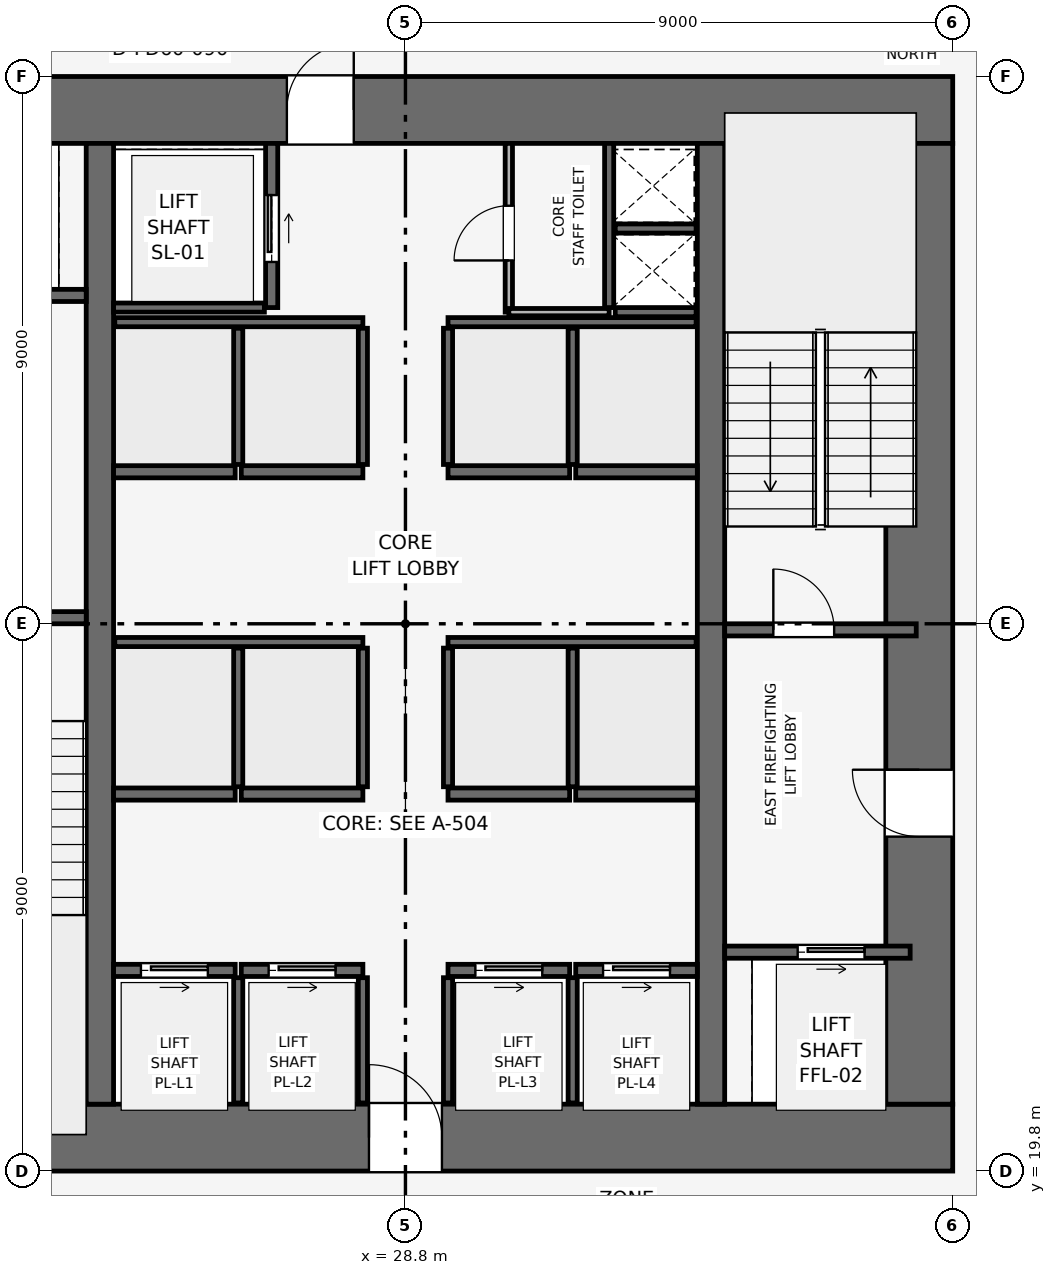
"""IFC4 building model, lengths in metres.
Left out: names, types, materials, properties, quantities, classifications, styles, units other than length and angle.
Written with IfcOpenShell. Run it as: python <this file> out.ifc"""

import sys

from ifc_helpers import new_model, si_unit, direction, frame, frame_2d, origin, place, context, subcontext, project, spatial, rectangle, extrude, element, fill, save


model = new_model("IFC4")
c1 = context("Model", 3, precision=1e-05, world=origin(), true_north=direction((0.0, 1.0)))
c2 = subcontext(c1, "Body", "Model", "MODEL_VIEW")
j1 = project(units=[si_unit("LENGTHUNIT", "METRE"), si_unit("PLANEANGLEUNIT", "RADIAN")], contexts=[c1])
p1 = place(None, origin())
s1 = spatial("IfcSite", under=j1, at=p1, CompositionType="ELEMENT")
p2 = place(p1, origin())
s2 = spatial("IfcBuilding", under=s1, at=p2, CompositionType="ELEMENT")
p3 = place(p2, frame((0.0, 0.0, 41.7)))
s3 = spatial("IfcBuildingStorey", under=s2, at=p3, CompositionType="ELEMENT", Elevation=41.7)
p4 = place(p3, frame((19.8, 20.35, 0.0), z_axis=(0.0, 0.0, 1.0), x_axis=(1.0, 0.0, 0.0)))
e1 = element("IfcWall", 1, at=p4, inside=s3, PredefinedType="SHEAR", context=c2, shape_type="SweptSolid", body=[
    extrude(rectangle(XDim=18.0, YDim=1.1, at=frame_2d((9.0, 0.0))), origin(), (0.0, 0.0, 1.0), 3.9),
])
p5 = place(p4, frame((8.4, 0.0, 0.0)))
e2 = element("IfcOpeningElement", 2, at=p5, cuts=e1, PredefinedType="OPENING", context=c2, shape_type="SweptSolid", body=[
    extrude(rectangle(XDim=1.2, YDim=2.2, at=frame_2d((0.6, 1.1))), frame((0.0, 0.56, 0.0), z_axis=(0.0, -1.0, 0.0), x_axis=(1.0, 0.0, 0.0)), (0.0, 0.0, 1.0), 1.12),
])
p6 = place(p3, frame((19.8, 37.25, 0.0), z_axis=(0.0, 0.0, 1.0), x_axis=(1.0, 0.0, 0.0)))
e3 = element("IfcWall", 3, at=p6, inside=s3, PredefinedType="SHEAR", context=c2, shape_type="SweptSolid", body=[
    extrude(rectangle(XDim=18.0, YDim=1.1, at=frame_2d((9.0, 0.0))), origin(), (0.0, 0.0, 1.0), 3.9),
])
p7 = place(p6, frame((7.05, 0.0, 0.0)))
e4 = element("IfcOpeningElement", 4, at=p7, cuts=e3, PredefinedType="OPENING", context=c2, shape_type="SweptSolid", body=[
    extrude(rectangle(XDim=1.1, YDim=2.15, at=frame_2d((0.55, 1.075))), frame((0.0, 0.56, 0.0), z_axis=(0.0, -1.0, 0.0), x_axis=(1.0, 0.0, 0.0)), (0.0, 0.0, 1.0), 1.12),
])
p8 = place(p3, frame((37.25, 20.9, 0.0), z_axis=(0.0, 0.0, 1.0), x_axis=(0.0, 1.0, 0.0)))
e5 = element("IfcWall", 5, at=p8, inside=s3, PredefinedType="SHEAR", context=c2, shape_type="SweptSolid", body=[
    extrude(rectangle(XDim=15.8, YDim=1.1, at=frame_2d((7.9, 0.0))), origin(), (0.0, 0.0, 1.0), 3.9),
])
p9 = place(p8, frame((4.4, 0.0, 0.0)))
e6 = element("IfcOpeningElement", 6, at=p9, cuts=e5, PredefinedType="OPENING", context=c2, shape_type="SweptSolid", body=[
    extrude(rectangle(XDim=1.1, YDim=2.15, at=frame_2d((0.55, 1.075))), frame((0.0, 0.56, 0.0), z_axis=(0.0, -1.0, 0.0), x_axis=(1.0, 0.0, 0.0)), (0.0, 0.0, 1.0), 1.12),
])
for number, where, z_axis, x_axis in (
    (7, (23.775, 20.9, 0.0), (0.0, 0.0, 1.0), (0.0, 1.0, 0.0)),
    (8, (33.825, 20.9, 0.0), (0.0, 0.0, 1.0), (0.0, 1.0, 0.0)),
):
    element("IfcWall", number, at=place(p3, frame(where, z_axis=z_axis, x_axis=x_axis)), inside=s3, PredefinedType="SHEAR", context=c2, shape_type="SweptSolid", body=[
        extrude(rectangle(XDim=15.8, YDim=0.45, at=frame_2d((7.9, 0.0))), origin(), (0.0, 0.0, 1.0), 3.9),
    ])
p10 = place(p3, frame((20.4, 28.9, 0.0), z_axis=(0.0, 0.0, 1.0), x_axis=(1.0, 0.0, 0.0)))
e9 = element("IfcWall", 9, at=p10, inside=s3, PredefinedType="SHEAR", context=c2, shape_type="SweptSolid", body=[
    extrude(rectangle(XDim=3.15, YDim=0.2, at=frame_2d((1.575, 0.0))), origin(), (0.0, 0.0, 1.0), 3.65),
])
p11 = place(p10, frame((0.8, 0.0, 0.0)))
e10 = element("IfcOpeningElement", 10, at=p11, cuts=e9, PredefinedType="OPENING", context=c2, shape_type="SweptSolid", body=[
    extrude(rectangle(XDim=1.0, YDim=2.1, at=frame_2d((0.5, 1.05))), frame((0.0, 0.11, 0.0), z_axis=(0.0, -1.0, 0.0), x_axis=(1.0, 0.0, 0.0)), (0.0, 0.0, 1.0), 0.22),
])
p12 = place(p3, frame((34.05, 28.7, 0.0), z_axis=(0.0, 0.0, 1.0), x_axis=(1.0, 0.0, 0.0)))
e11 = element("IfcWall", 11, at=p12, inside=s3, PredefinedType="SHEAR", context=c2, shape_type="SweptSolid", body=[
    extrude(rectangle(XDim=3.15, YDim=0.2, at=frame_2d((1.575, 0.0))), origin(), (0.0, 0.0, 1.0), 3.65),
])
p13 = place(p12, frame((0.8, 0.0, 0.0)))
e12 = element("IfcOpeningElement", 12, at=p13, cuts=e11, PredefinedType="OPENING", context=c2, shape_type="SweptSolid", body=[
    extrude(rectangle(XDim=1.0, YDim=2.1, at=frame_2d((0.5, 1.05))), frame((0.0, 0.11, 0.0), z_axis=(0.0, -1.0, 0.0), x_axis=(1.0, 0.0, 0.0)), (0.0, 0.0, 1.0), 0.22),
])
p14 = place(p3, frame((32.15, 34.0, 0.0), z_axis=(0.0, 0.0, 1.0), x_axis=(0.0, 1.0, 0.0)))
e13 = element("IfcWall", 13, at=p14, inside=s3, PredefinedType="SHEAR", context=c2, shape_type="SweptSolid", body=[
    extrude(rectangle(XDim=2.7, YDim=0.15, at=frame_2d((1.35, 0.0))), origin(), (0.0, 0.0, 1.0), 3.65),
])
for number, where, z_axis, x_axis in (
    (14, (32.25, 33.925, 0.0), (0.0, 0.0, 1.0), (1.0, 0.0, 0.0)),
    (15, (32.25, 35.3, 0.0), (0.0, 0.0, 1.0), (1.0, 0.0, 0.0)),
):
    element("IfcWall", number, at=place(p3, frame(where, z_axis=z_axis, x_axis=x_axis)), inside=s3, PredefinedType="SHEAR", context=c2, shape_type="SweptSolid", body=[
        extrude(rectangle(XDim=1.33, YDim=0.15, at=frame_2d((0.665, 0.0))), origin(), (0.0, 0.0, 1.0), 3.65),
    ])
p15 = place(p3, frame((20.5, 34.2, 0.0), z_axis=(0.0, 0.0, 1.0), x_axis=(1.0, 0.0, 0.0)))
e16 = element("IfcWall", 16, at=p15, inside=s3, PredefinedType="SHEAR", context=c2, shape_type="SweptSolid", body=[
    extrude(rectangle(XDim=3.05, YDim=0.2, at=frame_2d((1.525, 0.0))), origin(), (0.0, 0.0, 1.0), 3.65),
])
p16 = place(p15, frame((0.75, 0.0, 0.0)))
e17 = element("IfcOpeningElement", 17, at=p16, cuts=e16, PredefinedType="OPENING", context=c2, shape_type="SweptSolid", body=[
    extrude(rectangle(XDim=1.1, YDim=2.15, at=frame_2d((0.55, 1.075))), frame((0.0, 0.11, 0.0), z_axis=(0.0, -1.0, 0.0), x_axis=(1.0, 0.0, 0.0)), (0.0, 0.0, 1.0), 0.22),
])
p17 = place(p3, frame((34.05, 23.4, 0.0), z_axis=(0.0, 0.0, 1.0), x_axis=(1.0, 0.0, 0.0)))
e18 = element("IfcWall", 18, at=p17, inside=s3, PredefinedType="SHEAR", context=c2, shape_type="SweptSolid", body=[
    extrude(rectangle(XDim=3.05, YDim=0.2, at=frame_2d((1.525, 0.0))), origin(), (0.0, 0.0, 1.0), 3.65),
])
p18 = place(p17, frame((1.2, 0.0, 0.0)))
e19 = element("IfcOpeningElement", 19, at=p18, cuts=e18, PredefinedType="OPENING", context=c2, shape_type="SweptSolid", body=[
    extrude(rectangle(XDim=1.1, YDim=2.15, at=frame_2d((0.55, 1.075))), frame((0.0, 0.11, 0.0), z_axis=(0.0, -1.0, 0.0), x_axis=(1.0, 0.0, 0.0)), (0.0, 0.0, 1.0), 0.22),
])
p19 = place(p3, frame((26.6, 34.0, 0.0), z_axis=(0.0, 0.0, 1.0), x_axis=(0.0, 1.0, 0.0)))
e20 = element("IfcWall", 20, at=p19, inside=s3, PredefinedType="SHEAR", context=c2, shape_type="SweptSolid", body=[
    extrude(rectangle(XDim=2.7, YDim=0.2, at=frame_2d((1.35, 0.0))), origin(), (0.0, 0.0, 1.0), 3.65),
])
p20 = place(p19, frame((0.75, 0.0, 0.0)))
e21 = element("IfcOpeningElement", 21, at=p20, cuts=e20, PredefinedType="OPENING", context=c2, shape_type="SweptSolid", body=[
    extrude(rectangle(XDim=1.1, YDim=2.15, at=frame_2d((0.55, 1.075))), frame((0.0, 0.11, 0.0), z_axis=(0.0, -1.0, 0.0), x_axis=(1.0, 0.0, 0.0)), (0.0, 0.0, 1.0), 0.22),
])
p21 = place(p3, frame((24.0, 34.0, 0.0), z_axis=(0.0, 0.0, 1.0), x_axis=(1.0, 0.0, 0.0)))
e22 = element("IfcWall", 22, at=p21, inside=s3, PredefinedType="SHEAR", context=c2, shape_type="SweptSolid", body=[
    extrude(rectangle(XDim=2.48, YDim=0.15, at=frame_2d((1.24, 0.0))), origin(), (0.0, 0.0, 1.0), 3.65),
])
p22 = place(p3, frame((24.0, 23.1, 0.0), z_axis=(0.0, 0.0, 1.0), x_axis=(1.0, 0.0, 0.0)))
e23 = element("IfcWall", 23, at=p22, inside=s3, PredefinedType="SHEAR", context=c2, shape_type="SweptSolid", body=[
    extrude(rectangle(XDim=2.0, YDim=0.2, at=frame_2d((1.0, 0.0))), origin(), (0.0, 0.0, 1.0), 3.65),
])
p23 = place(p22, frame((0.45, 0.0, 0.0)))
e24 = element("IfcOpeningElement", 24, at=p23, cuts=e23, PredefinedType="OPENING", context=c2, shape_type="SweptSolid", body=[
    extrude(rectangle(XDim=1.1, YDim=2.15, at=frame_2d((0.55, 1.075))), frame((0.0, 0.11, 0.0), z_axis=(0.0, -1.0, 0.0), x_axis=(1.0, 0.0, 0.0)), (0.0, 0.0, 1.0), 0.22),
])
p24 = place(p3, frame((26.1, 23.1, 0.0), z_axis=(0.0, 0.0, 1.0), x_axis=(1.0, 0.0, 0.0)))
e25 = element("IfcWall", 25, at=p24, inside=s3, PredefinedType="SHEAR", context=c2, shape_type="SweptSolid", body=[
    extrude(rectangle(XDim=2.0, YDim=0.2, at=frame_2d((1.0, 0.0))), origin(), (0.0, 0.0, 1.0), 3.65),
])
p25 = place(p24, frame((0.45, 0.0, 0.0)))
e26 = element("IfcOpeningElement", 26, at=p25, cuts=e25, PredefinedType="OPENING", context=c2, shape_type="SweptSolid", body=[
    extrude(rectangle(XDim=1.1, YDim=2.15, at=frame_2d((0.55, 1.075))), frame((0.0, 0.11, 0.0), z_axis=(0.0, -1.0, 0.0), x_axis=(1.0, 0.0, 0.0)), (0.0, 0.0, 1.0), 0.22),
])
p26 = place(p3, frame((29.5, 23.1, 0.0), z_axis=(0.0, 0.0, 1.0), x_axis=(1.0, 0.0, 0.0)))
e27 = element("IfcWall", 27, at=p26, inside=s3, PredefinedType="SHEAR", context=c2, shape_type="SweptSolid", body=[
    extrude(rectangle(XDim=2.0, YDim=0.2, at=frame_2d((1.0, 0.0))), origin(), (0.0, 0.0, 1.0), 3.65),
])
p27 = place(p26, frame((0.45, 0.0, 0.0)))
e28 = element("IfcOpeningElement", 28, at=p27, cuts=e27, PredefinedType="OPENING", context=c2, shape_type="SweptSolid", body=[
    extrude(rectangle(XDim=1.1, YDim=2.15, at=frame_2d((0.55, 1.075))), frame((0.0, 0.11, 0.0), z_axis=(0.0, -1.0, 0.0), x_axis=(1.0, 0.0, 0.0)), (0.0, 0.0, 1.0), 0.22),
])
p28 = place(p3, frame((31.6, 23.1, 0.0), z_axis=(0.0, 0.0, 1.0), x_axis=(1.0, 0.0, 0.0)))
e29 = element("IfcWall", 29, at=p28, inside=s3, PredefinedType="SHEAR", context=c2, shape_type="SweptSolid", body=[
    extrude(rectangle(XDim=2.0, YDim=0.2, at=frame_2d((1.0, 0.0))), origin(), (0.0, 0.0, 1.0), 3.65),
])
p29 = place(p28, frame((0.45, 0.0, 0.0)))
e30 = element("IfcOpeningElement", 30, at=p29, cuts=e29, PredefinedType="OPENING", context=c2, shape_type="SweptSolid", body=[
    extrude(rectangle(XDim=1.1, YDim=2.15, at=frame_2d((0.55, 1.075))), frame((0.0, 0.11, 0.0), z_axis=(0.0, -1.0, 0.0), x_axis=(1.0, 0.0, 0.0)), (0.0, 0.0, 1.0), 0.22),
])
for number, where, z_axis, x_axis in (
    (31, (24.0, 26.0, 0.0), (0.0, 0.0, 1.0), (1.0, 0.0, 0.0)),
    (32, (26.1, 26.0, 0.0), (0.0, 0.0, 1.0), (1.0, 0.0, 0.0)),
    (33, (29.5, 26.0, 0.0), (0.0, 0.0, 1.0), (1.0, 0.0, 0.0)),
    (34, (31.6, 26.0, 0.0), (0.0, 0.0, 1.0), (1.0, 0.0, 0.0)),
    (35, (24.0, 31.3, 0.0), (0.0, 0.0, 1.0), (1.0, 0.0, 0.0)),
    (36, (26.1, 31.3, 0.0), (0.0, 0.0, 1.0), (1.0, 0.0, 0.0)),
    (37, (29.5, 31.3, 0.0), (0.0, 0.0, 1.0), (1.0, 0.0, 0.0)),
    (38, (31.6, 31.3, 0.0), (0.0, 0.0, 1.0), (1.0, 0.0, 0.0)),
):
    element("IfcWall", number, at=place(p3, frame(where, z_axis=z_axis, x_axis=x_axis)), inside=s3, PredefinedType="SHEAR", context=c2, shape_type="SweptSolid", body=[
        extrude(rectangle(XDim=2.0, YDim=0.2, at=frame_2d((1.0, 0.0))), origin(), (0.0, 0.0, 1.0), 3.65),
    ])
for number, where, z_axis, x_axis in (
    (39, (26.05, 20.92, 0.0), (0.0, 0.0, 1.0), (0.0, 1.0, 0.0)),
    (40, (28.1, 20.92, 0.0), (0.0, 0.0, 1.0), (0.0, 1.0, 0.0)),
    (41, (29.5, 20.92, 0.0), (0.0, 0.0, 1.0), (0.0, 1.0, 0.0)),
    (42, (31.55, 20.92, 0.0), (0.0, 0.0, 1.0), (0.0, 1.0, 0.0)),
):
    element("IfcWall", number, at=place(p3, frame(where, z_axis=z_axis, x_axis=x_axis)), inside=s3, PredefinedType="SHEAR", context=c2, shape_type="SweptSolid", body=[
        extrude(rectangle(XDim=2.06, YDim=0.15, at=frame_2d((1.03, 0.0))), origin(), (0.0, 0.0, 1.0), 3.65),
    ])
for number, where, z_axis, x_axis in (
    (43, (24.02, 28.5, 0.0), (0.0, 0.0, 1.0), (1.0, 0.0, 0.0)),
    (44, (29.5, 28.5, 0.0), (0.0, 0.0, 1.0), (1.0, 0.0, 0.0)),
):
    element("IfcWall", number, at=place(p3, frame(where, z_axis=z_axis, x_axis=x_axis)), inside=s3, PredefinedType="SHEAR", context=c2, shape_type="SweptSolid", body=[
        extrude(rectangle(XDim=4.08, YDim=0.15, at=frame_2d((2.04, 0.0))), origin(), (0.0, 0.0, 1.0), 3.65),
    ])
for number, where, z_axis, x_axis in (
    (45, (26.05, 26.12, 0.0), (0.0, 0.0, 1.0), (0.0, 1.0, 0.0)),
    (46, (28.1, 26.12, 0.0), (0.0, 0.0, 1.0), (0.0, 1.0, 0.0)),
    (47, (29.5, 26.12, 0.0), (0.0, 0.0, 1.0), (0.0, 1.0, 0.0)),
    (48, (31.55, 26.12, 0.0), (0.0, 0.0, 1.0), (0.0, 1.0, 0.0)),
):
    element("IfcWall", number, at=place(p3, frame(where, z_axis=z_axis, x_axis=x_axis)), inside=s3, PredefinedType="SHEAR", context=c2, shape_type="SweptSolid", body=[
        extrude(rectangle(XDim=2.28, YDim=0.15, at=frame_2d((1.14, 0.0))), origin(), (0.0, 0.0, 1.0), 3.65),
    ])
for number, where, z_axis, x_axis in (
    (49, (24.02, 33.76, 0.0), (0.0, 0.0, 1.0), (1.0, 0.0, 0.0)),
    (50, (29.5, 33.76, 0.0), (0.0, 0.0, 1.0), (1.0, 0.0, 0.0)),
):
    element("IfcWall", number, at=place(p3, frame(where, z_axis=z_axis, x_axis=x_axis)), inside=s3, PredefinedType="SHEAR", context=c2, shape_type="SweptSolid", body=[
        extrude(rectangle(XDim=4.08, YDim=0.15, at=frame_2d((2.04, 0.0))), origin(), (0.0, 0.0, 1.0), 3.65),
    ])
for number, where, z_axis, x_axis in (
    (51, (26.05, 31.42, 0.0), (0.0, 0.0, 1.0), (0.0, 1.0, 0.0)),
    (52, (28.1, 31.42, 0.0), (0.0, 0.0, 1.0), (0.0, 1.0, 0.0)),
    (53, (29.5, 31.42, 0.0), (0.0, 0.0, 1.0), (0.0, 1.0, 0.0)),
    (54, (31.55, 31.42, 0.0), (0.0, 0.0, 1.0), (0.0, 1.0, 0.0)),
):
    element("IfcWall", number, at=place(p3, frame(where, z_axis=z_axis, x_axis=x_axis)), inside=s3, PredefinedType="SHEAR", context=c2, shape_type="SweptSolid", body=[
        extrude(rectangle(XDim=2.24, YDim=0.15, at=frame_2d((1.12, 0.0))), origin(), (0.0, 0.0, 1.0), 3.65),
    ])
p30 = place(p3, frame((30.5, 33.925, 0.0), z_axis=(0.0, 0.0, 1.0), x_axis=(0.0, 1.0, 0.0)))
e55 = element("IfcWall", 55, at=p30, inside=s3, PredefinedType="PARTITIONING", context=c2, shape_type="SweptSolid", body=[
    extrude(rectangle(XDim=2.775, YDim=0.12, at=frame_2d((1.387, 0.0))), origin(), (0.0, 0.0, 1.0), 3.65),
])
p31 = place(p30, frame((0.85, 0.0, 0.0)))
e56 = element("IfcOpeningElement", 56, at=p31, cuts=e55, PredefinedType="OPENING", context=c2, shape_type="SweptSolid", body=[
    extrude(rectangle(XDim=0.9, YDim=2.1, at=frame_2d((0.45, 1.05))), frame((0.0, 0.07, 0.0), z_axis=(0.0, -1.0, 0.0), x_axis=(1.0, 0.0, 0.0)), (0.0, 0.0, 1.0), 0.14),
])
p32 = place(p3, frame((30.5, 33.925, 0.0), z_axis=(0.0, 0.0, 1.0), x_axis=(1.0, 0.0, 0.0)))
e57 = element("IfcWall", 57, at=p32, inside=s3, PredefinedType="PARTITIONING", context=c2, shape_type="SweptSolid", body=[
    extrude(rectangle(XDim=1.65, YDim=0.12, at=frame_2d((0.825, 0.0))), origin(), (0.0, 0.0, 1.0), 3.65),
])
p33 = place(p13, origin())
e58 = element("IfcDoor", 58, at=p33, inside=s3, OperationType="SINGLE_SWING_LEFT", PredefinedType="DOOR", context=c2, shape_type="SweptSolid", body=[
    extrude(rectangle(XDim=1.0, YDim=2.1, at=frame_2d((0.5, 1.05))), frame((0.0, 0.025, 0.0), z_axis=(0.0, -1.0, 0.0), x_axis=(1.0, 0.0, 0.0)), (0.0, 0.0, 1.0), 0.05),
])
fill(e12, e58)
p34 = place(p18, origin())
e59 = element("IfcDoor", 59, at=p34, inside=s3, OperationType="SLIDING_TO_RIGHT", PredefinedType="DOOR", context=c2, shape_type="SweptSolid", body=[
    extrude(rectangle(XDim=1.1, YDim=2.15, at=frame_2d((0.55, 1.075))), frame((0.0, 0.025, 0.0), z_axis=(0.0, -1.0, 0.0), x_axis=(1.0, 0.0, 0.0)), (0.0, 0.0, 1.0), 0.05),
])
fill(e19, e59)
p35 = place(p20, origin())
e60 = element("IfcDoor", 60, at=p35, inside=s3, OperationType="SLIDING_TO_RIGHT", PredefinedType="DOOR", context=c2, shape_type="SweptSolid", body=[
    extrude(rectangle(XDim=1.1, YDim=2.15, at=frame_2d((0.55, 1.075))), frame((0.0, 0.025, 0.0), z_axis=(0.0, -1.0, 0.0), x_axis=(1.0, 0.0, 0.0)), (0.0, 0.0, 1.0), 0.05),
])
fill(e21, e60)
p36 = place(p23, origin())
e61 = element("IfcDoor", 61, at=p36, inside=s3, OperationType="SLIDING_TO_RIGHT", PredefinedType="DOOR", context=c2, shape_type="SweptSolid", body=[
    extrude(rectangle(XDim=1.1, YDim=2.15, at=frame_2d((0.55, 1.075))), frame((0.0, 0.025, 0.0), z_axis=(0.0, -1.0, 0.0), x_axis=(1.0, 0.0, 0.0)), (0.0, 0.0, 1.0), 0.05),
])
fill(e24, e61)
p37 = place(p25, origin())
e62 = element("IfcDoor", 62, at=p37, inside=s3, OperationType="SLIDING_TO_RIGHT", PredefinedType="DOOR", context=c2, shape_type="SweptSolid", body=[
    extrude(rectangle(XDim=1.1, YDim=2.15, at=frame_2d((0.55, 1.075))), frame((0.0, 0.025, 0.0), z_axis=(0.0, -1.0, 0.0), x_axis=(1.0, 0.0, 0.0)), (0.0, 0.0, 1.0), 0.05),
])
fill(e26, e62)
p38 = place(p27, origin())
e63 = element("IfcDoor", 63, at=p38, inside=s3, OperationType="SLIDING_TO_RIGHT", PredefinedType="DOOR", context=c2, shape_type="SweptSolid", body=[
    extrude(rectangle(XDim=1.1, YDim=2.15, at=frame_2d((0.55, 1.075))), frame((0.0, 0.025, 0.0), z_axis=(0.0, -1.0, 0.0), x_axis=(1.0, 0.0, 0.0)), (0.0, 0.0, 1.0), 0.05),
])
fill(e28, e63)
p39 = place(p29, origin())
e64 = element("IfcDoor", 64, at=p39, inside=s3, OperationType="SLIDING_TO_RIGHT", PredefinedType="DOOR", context=c2, shape_type="SweptSolid", body=[
    extrude(rectangle(XDim=1.1, YDim=2.15, at=frame_2d((0.55, 1.075))), frame((0.0, 0.025, 0.0), z_axis=(0.0, -1.0, 0.0), x_axis=(1.0, 0.0, 0.0)), (0.0, 0.0, 1.0), 0.05),
])
fill(e30, e64)
p40 = place(p31, origin())
e65 = element("IfcDoor", 65, at=p40, inside=s3, OperationType="SINGLE_SWING_LEFT", PredefinedType="DOOR", context=c2, shape_type="SweptSolid", body=[
    extrude(rectangle(XDim=0.9, YDim=2.1, at=frame_2d((0.45, 1.05))), frame((0.0, 0.025, 0.0), z_axis=(0.0, -1.0, 0.0), x_axis=(1.0, 0.0, 0.0)), (0.0, 0.0, 1.0), 0.05),
])
fill(e56, e65)
p41 = place(p9, origin())
e66 = element("IfcDoor", 66, at=p41, inside=s3, OperationType="SINGLE_SWING_RIGHT", PredefinedType="DOOR", context=c2, shape_type="SweptSolid", body=[
    extrude(rectangle(XDim=1.1, YDim=2.15, at=frame_2d((0.55, 1.075))), frame((0.0, 0.025, 0.0), z_axis=(0.0, -1.0, 0.0), x_axis=(1.0, 0.0, 0.0)), (0.0, 0.0, 1.0), 0.05),
])
fill(e6, e66)
p42 = place(p5, origin())
e67 = element("IfcDoor", 67, at=p42, inside=s3, OperationType="SINGLE_SWING_LEFT", PredefinedType="DOOR", context=c2, shape_type="SweptSolid", body=[
    extrude(rectangle(XDim=1.2, YDim=2.2, at=frame_2d((0.6, 1.1))), frame((0.0, 0.025, 0.0), z_axis=(0.0, -1.0, 0.0), x_axis=(1.0, 0.0, 0.0)), (0.0, 0.0, 1.0), 0.05),
])
fill(e2, e67)
p43 = place(p7, origin())
e68 = element("IfcDoor", 68, at=p43, inside=s3, OperationType="SINGLE_SWING_RIGHT", PredefinedType="DOOR", context=c2, shape_type="SweptSolid", body=[
    extrude(rectangle(XDim=1.1, YDim=2.15, at=frame_2d((0.55, 1.075))), frame((0.0, 0.025, 0.0), z_axis=(0.0, -1.0, 0.0), x_axis=(1.0, 0.0, 0.0)), (0.0, 0.0, 1.0), 0.05),
])
fill(e4, e68)
save(model, sys.argv[1])
